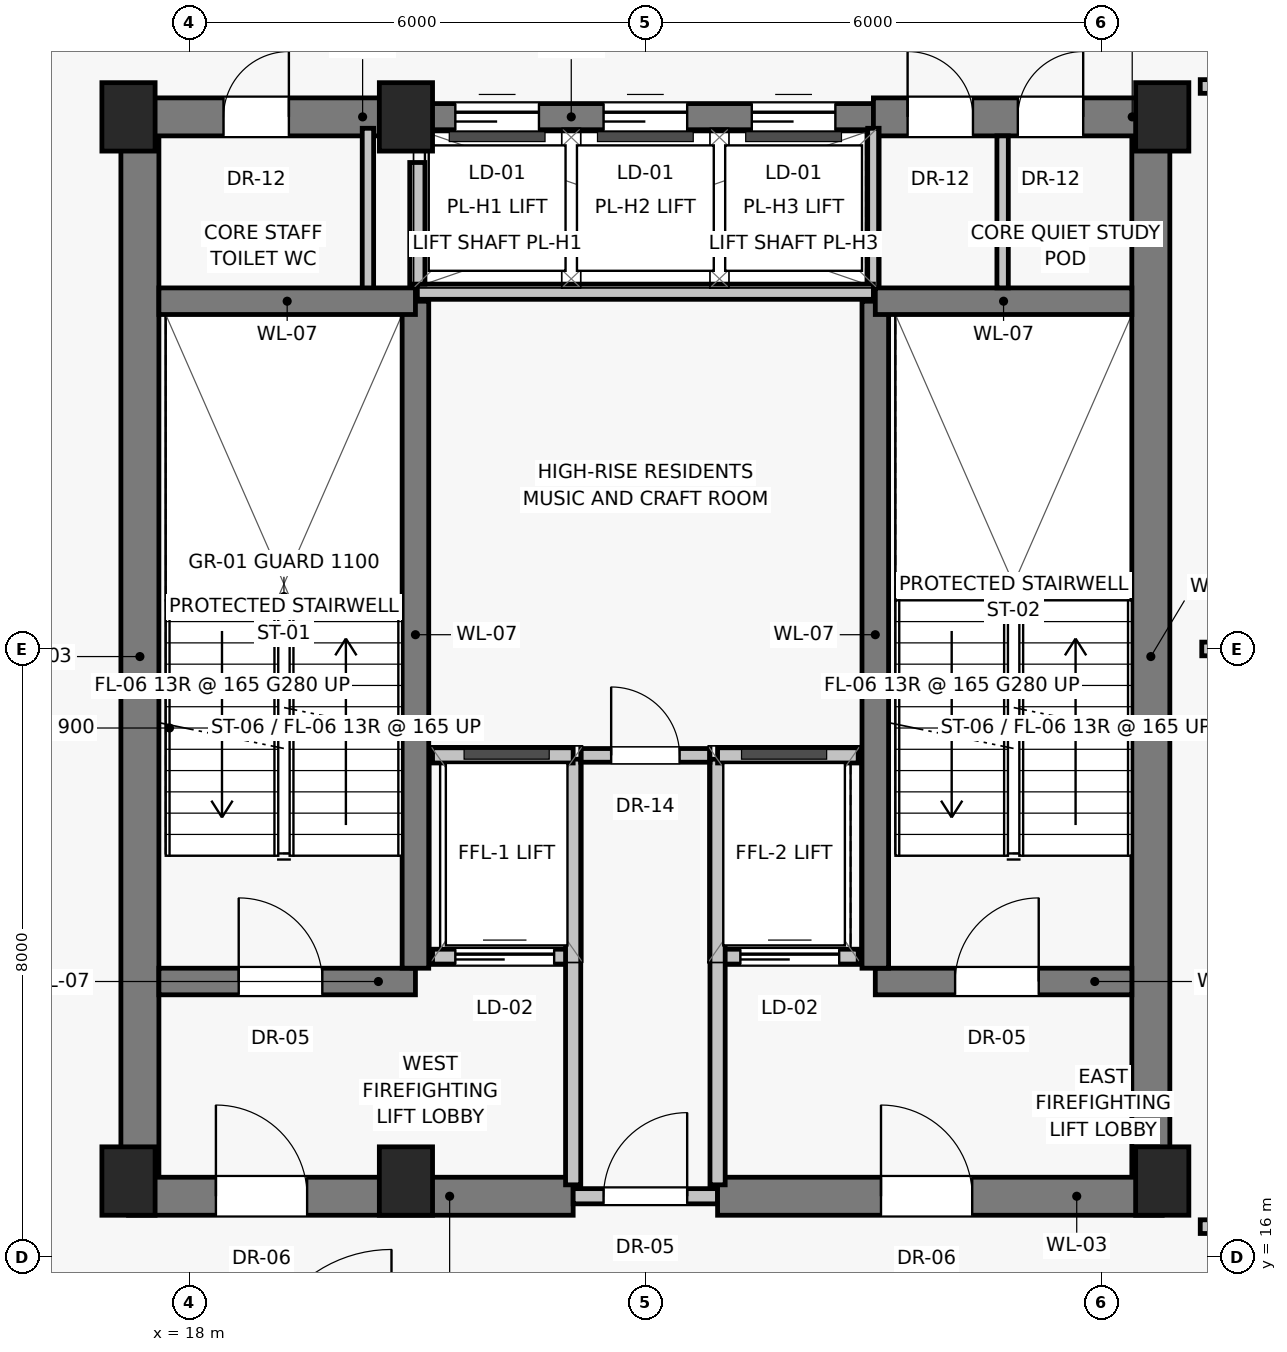
"""IFC4 building model, lengths in metres.
Left out: names, types, materials, properties, quantities, classifications, styles, units other than length and angle.
Written with IfcOpenShell. Run it as: python <this file> out.ifc"""

import sys

from ifc_helpers import new_model, si_unit, direction, frame, frame_2d, origin, origin_2d, place, context, subcontext, project, spatial, rectangle, extrude, source, transform, mapped, element, fill, save


model = new_model("IFC4")
c1 = context("Model", 3, precision=1e-05, world=origin(), true_north=direction((0.0, 1.0)))
c2 = subcontext(c1, "Body", "Model", "MODEL_VIEW")
j1 = project(units=[si_unit("LENGTHUNIT", "METRE"), si_unit("PLANEANGLEUNIT", "RADIAN")], contexts=[c1])
p1 = place(None, origin())
s1 = spatial("IfcSite", under=j1, at=p1, CompositionType="ELEMENT")
p2 = place(p1, origin())
s2 = spatial("IfcBuilding", under=s1, at=p2, CompositionType="ELEMENT")
p3 = place(p2, frame((0.0, 0.0, 211.35)))
s3 = spatial("IfcBuildingStorey", under=s2, at=p3, CompositionType="ELEMENT", Elevation=211.35)
for number, where, z_axis, x_axis in (
    (1, (17.2, 17.0, 0.0), (0.0, 0.0, 1.0), (1.0, 0.0, 0.0)),
    (2, (20.85, 17.0, 0.0), (0.0, 0.0, 1.0), (1.0, 0.0, 0.0)),
    (3, (30.8, 17.0, 0.0), (0.0, 0.0, 1.0), (1.0, 0.0, 0.0)),
    (4, (17.2, 31.0, 0.0), (0.0, 0.0, 1.0), (1.0, 0.0, 0.0)),
    (5, (20.85, 31.0, 0.0), (0.0, 0.0, 1.0), (1.0, 0.0, 0.0)),
    (6, (30.8, 31.0, 0.0), (0.0, 0.0, 1.0), (1.0, 0.0, 0.0)),
):
    element("IfcColumn", number, at=place(p3, frame(where, z_axis=z_axis, x_axis=x_axis)), inside=s3, PredefinedType="PILASTER", context=c2, shape_type="SweptSolid", body=[
        extrude(rectangle(XDim=0.7, YDim=0.9, at=origin_2d()), origin(), (0.0, 0.0, 1.0), 4.3),
    ])
for number, where, z_axis, x_axis in (
    (7, (17.35, 16.8, 0.0), (0.0, 0.0, 1.0), (0.0, 1.0, 0.0)),
    (8, (30.65, 16.8, 0.0), (0.0, 0.0, 1.0), (0.0, 1.0, 0.0)),
):
    element("IfcWall", number, at=place(p3, frame(where, z_axis=z_axis, x_axis=x_axis)), inside=s3, PredefinedType="SHEAR", context=c2, shape_type="SweptSolid", body=[
        extrude(rectangle(XDim=14.2, YDim=0.5, at=frame_2d((7.1, 0.0))), origin(), (0.0, 0.0, 1.0), 4.065),
    ])
p4 = place(p3, frame((17.2, 16.8, 0.0), z_axis=(0.0, 0.0, 1.0), x_axis=(1.0, 0.0, 0.0)))
e9 = element("IfcWall", 9, at=p4, inside=s3, PredefinedType="SHEAR", context=c2, shape_type="SweptSolid", body=[
    extrude(rectangle(XDim=5.85, YDim=0.5, at=frame_2d((2.925, 0.0))), origin(), (0.0, 0.0, 1.0), 4.065),
])
p5 = place(p4, frame((1.15, 0.0, 0.0)))
e10 = element("IfcOpeningElement", 10, at=p5, cuts=e9, PredefinedType="OPENING", context=c2, shape_type="SweptSolid", body=[
    extrude(rectangle(XDim=1.2, YDim=2.03, at=frame_2d((0.6, 1.015))), frame((0.0, 0.26, 0.0), z_axis=(0.0, -1.0, 0.0), x_axis=(1.0, 0.0, 0.0)), (0.0, 0.0, 1.0), 0.52),
])
p6 = place(p3, frame((23.05, 16.8, 0.0), z_axis=(0.0, 0.0, 1.0), x_axis=(1.0, 0.0, 0.0)))
e11 = element("IfcWall", 11, at=p6, inside=s3, PredefinedType="SOLIDWALL", context=c2, shape_type="SweptSolid", body=[
    extrude(rectangle(XDim=1.9, YDim=0.2, at=frame_2d((0.95, 0.0))), origin(), (0.0, 0.0, 1.0), 3.215),
])
p7 = place(p6, frame((0.4, 0.0, 0.0)))
e12 = element("IfcOpeningElement", 12, at=p7, cuts=e11, PredefinedType="OPENING", context=c2, shape_type="SweptSolid", body=[
    extrude(rectangle(XDim=1.1, YDim=2.03, at=frame_2d((0.55, 1.015))), frame((0.0, 0.11, 0.0), z_axis=(0.0, -1.0, 0.0), x_axis=(1.0, 0.0, 0.0)), (0.0, 0.0, 1.0), 0.22),
])
p8 = place(p3, frame((24.95, 16.8, 0.0), z_axis=(0.0, 0.0, 1.0), x_axis=(1.0, 0.0, 0.0)))
e13 = element("IfcWall", 13, at=p8, inside=s3, PredefinedType="SHEAR", context=c2, shape_type="SweptSolid", body=[
    extrude(rectangle(XDim=5.85, YDim=0.5, at=frame_2d((2.925, 0.0))), origin(), (0.0, 0.0, 1.0), 4.065),
])
p9 = place(p8, frame((2.15, 0.0, 0.0)))
e14 = element("IfcOpeningElement", 14, at=p9, cuts=e13, PredefinedType="OPENING", context=c2, shape_type="SweptSolid", body=[
    extrude(rectangle(XDim=1.2, YDim=2.03, at=frame_2d((0.6, 1.015))), frame((0.0, 0.26, 0.0), z_axis=(0.0, -1.0, 0.0), x_axis=(1.0, 0.0, 0.0)), (0.0, 0.0, 1.0), 0.52),
])
p10 = place(p3, frame((17.2, 31.0, 0.0), z_axis=(0.0, 0.0, 1.0), x_axis=(1.0, 0.0, 0.0)))
e15 = element("IfcWall", 15, at=p10, inside=s3, PredefinedType="SHEAR", context=c2, shape_type="SweptSolid", body=[
    extrude(rectangle(XDim=3.8, YDim=0.5, at=frame_2d((1.9, 0.0))), origin(), (0.0, 0.0, 1.0), 4.065),
])
p11 = place(p10, frame((1.25, 0.0, 0.0)))
e16 = element("IfcOpeningElement", 16, at=p11, cuts=e15, PredefinedType="OPENING", context=c2, shape_type="SweptSolid", body=[
    extrude(rectangle(XDim=0.86, YDim=2.01, at=frame_2d((0.43, 1.005))), frame((0.0, 0.26, 0.0), z_axis=(0.0, -1.0, 0.0), x_axis=(1.0, 0.0, 0.0)), (0.0, 0.0, 1.0), 0.52),
])
p12 = place(p3, frame((21.0, 31.0, 0.0), z_axis=(0.0, 0.0, 1.0), x_axis=(1.0, 0.0, 0.0)))
e17 = element("IfcWall", 17, at=p12, inside=s3, PredefinedType="SHEAR", context=c2, shape_type="SweptSolid", body=[
    extrude(rectangle(XDim=6.0, YDim=0.35, at=frame_2d((3.0, 0.0))), origin(), (0.0, 0.0, 1.0), 4.065),
])
p13 = place(p12, frame((0.5, 0.0, 0.0)))
e18 = element("IfcOpeningElement", 18, at=p13, cuts=e17, PredefinedType="OPENING", context=c2, shape_type="SweptSolid", body=[
    extrude(rectangle(XDim=1.1, YDim=2.08, at=frame_2d((0.55, 1.04))), frame((0.0, 0.185, 0.0), z_axis=(0.0, -1.0, 0.0), x_axis=(1.0, 0.0, 0.0)), (0.0, 0.0, 1.0), 0.37),
])
p14 = place(p12, frame((2.45, 0.0, 0.0)))
e19 = element("IfcOpeningElement", 19, at=p14, cuts=e17, PredefinedType="OPENING", context=c2, shape_type="SweptSolid", body=[
    extrude(rectangle(XDim=1.1, YDim=2.08, at=frame_2d((0.55, 1.04))), frame((0.0, 0.185, 0.0), z_axis=(0.0, -1.0, 0.0), x_axis=(1.0, 0.0, 0.0)), (0.0, 0.0, 1.0), 0.37),
])
p15 = place(p12, frame((4.4, 0.0, 0.0)))
e20 = element("IfcOpeningElement", 20, at=p15, cuts=e17, PredefinedType="OPENING", context=c2, shape_type="SweptSolid", body=[
    extrude(rectangle(XDim=1.1, YDim=2.08, at=frame_2d((0.55, 1.04))), frame((0.0, 0.185, 0.0), z_axis=(0.0, -1.0, 0.0), x_axis=(1.0, 0.0, 0.0)), (0.0, 0.0, 1.0), 0.37),
])
p16 = place(p3, frame((27.0, 31.0, 0.0), z_axis=(0.0, 0.0, 1.0), x_axis=(1.0, 0.0, 0.0)))
e21 = element("IfcWall", 21, at=p16, inside=s3, PredefinedType="SHEAR", context=c2, shape_type="SweptSolid", body=[
    extrude(rectangle(XDim=3.8, YDim=0.5, at=frame_2d((1.9, 0.0))), origin(), (0.0, 0.0, 1.0), 4.065),
])
p17 = place(p16, frame((0.45, 0.0, 0.0)))
e22 = element("IfcOpeningElement", 22, at=p17, cuts=e21, PredefinedType="OPENING", context=c2, shape_type="SweptSolid", body=[
    extrude(rectangle(XDim=0.86, YDim=2.01, at=frame_2d((0.43, 1.005))), frame((0.0, 0.26, 0.0), z_axis=(0.0, -1.0, 0.0), x_axis=(1.0, 0.0, 0.0)), (0.0, 0.0, 1.0), 0.52),
])
p18 = place(p16, frame((1.9, 0.0, 0.0)))
e23 = element("IfcOpeningElement", 23, at=p18, cuts=e21, PredefinedType="OPENING", context=c2, shape_type="SweptSolid", body=[
    extrude(rectangle(XDim=0.86, YDim=2.01, at=frame_2d((0.43, 1.005))), frame((0.0, 0.26, 0.0), z_axis=(0.0, -1.0, 0.0), x_axis=(1.0, 0.0, 0.0)), (0.0, 0.0, 1.0), 0.52),
])
for number, where, z_axis, x_axis in (
    (24, (20.35, 28.65, 0.0), (0.0, 0.0, 1.0), (0.0, 1.0, 0.0)),
    (25, (27.0, 28.65, 0.0), (0.0, 0.0, 1.0), (0.0, 1.0, 0.0)),
):
    element("IfcWall", number, at=place(p3, frame(where, z_axis=z_axis, x_axis=x_axis)), inside=s3, PredefinedType="PARTITIONING", context=c2, shape_type="SweptSolid", body=[
        extrude(rectangle(XDim=2.2, YDim=0.15, at=frame_2d((1.1, 0.0))), origin(), (0.0, 0.0, 1.0), 4.065),
    ])
p19 = place(p3, frame((17.6, 19.625, 0.0), z_axis=(0.0, 0.0, 1.0), x_axis=(1.0, 0.0, 0.0)))
e26 = element("IfcWall", 26, at=p19, inside=s3, PredefinedType="SHEAR", context=c2, shape_type="SweptSolid", body=[
    extrude(rectangle(XDim=3.375, YDim=0.35, at=frame_2d((1.688, 0.0))), origin(), (0.0, 0.0, 1.0), 4.065),
])
p20 = place(p19, frame((1.05, 0.0, 0.0)))
e27 = element("IfcOpeningElement", 27, at=p20, cuts=e26, PredefinedType="OPENING", context=c2, shape_type="SweptSolid", body=[
    extrude(rectangle(XDim=1.1, YDim=2.03, at=frame_2d((0.55, 1.015))), frame((0.0, 0.185, 0.0), z_axis=(0.0, -1.0, 0.0), x_axis=(1.0, 0.0, 0.0)), (0.0, 0.0, 1.0), 0.37),
])
p21 = place(p3, frame((21.2, 19.95, 0.0), z_axis=(0.0, 0.0, 1.0), x_axis=(1.0, 0.0, 0.0)))
e28 = element("IfcWall", 28, at=p21, inside=s3, PredefinedType="SOLIDWALL", context=c2, shape_type="SweptSolid", body=[
    extrude(rectangle(XDim=1.85, YDim=0.2, at=frame_2d((0.925, 0.0))), origin(), (0.0, 0.0, 1.0), 4.065),
])
p22 = place(p21, frame((0.3, 0.0, 0.0)))
e29 = element("IfcOpeningElement", 29, at=p22, cuts=e28, PredefinedType="OPENING", context=c2, shape_type="SweptSolid", body=[
    extrude(rectangle(XDim=1.3, YDim=2.25, at=frame_2d((0.65, 1.125))), frame((0.0, 0.11, 0.0), z_axis=(0.0, -1.0, 0.0), x_axis=(1.0, 0.0, 0.0)), (0.0, 0.0, 1.0), 0.22),
])
p23 = place(p3, frame((24.95, 19.95, 0.0), z_axis=(0.0, 0.0, 1.0), x_axis=(1.0, 0.0, 0.0)))
e30 = element("IfcWall", 30, at=p23, inside=s3, PredefinedType="SOLIDWALL", context=c2, shape_type="SweptSolid", body=[
    extrude(rectangle(XDim=1.85, YDim=0.2, at=frame_2d((0.925, 0.0))), origin(), (0.0, 0.0, 1.0), 4.065),
])
p24 = place(p23, frame((0.3, 0.0, 0.0)))
e31 = element("IfcOpeningElement", 31, at=p24, cuts=e30, PredefinedType="OPENING", context=c2, shape_type="SweptSolid", body=[
    extrude(rectangle(XDim=1.3, YDim=2.25, at=frame_2d((0.65, 1.125))), frame((0.0, 0.11, 0.0), z_axis=(0.0, -1.0, 0.0), x_axis=(1.0, 0.0, 0.0)), (0.0, 0.0, 1.0), 0.22),
])
p25 = place(p3, frame((27.025, 19.625, 0.0), z_axis=(0.0, 0.0, 1.0), x_axis=(1.0, 0.0, 0.0)))
e32 = element("IfcWall", 32, at=p25, inside=s3, PredefinedType="SHEAR", context=c2, shape_type="SweptSolid", body=[
    extrude(rectangle(XDim=3.375, YDim=0.35, at=frame_2d((1.688, 0.0))), origin(), (0.0, 0.0, 1.0), 4.065),
])
p26 = place(p25, frame((1.05, 0.0, 0.0)))
e33 = element("IfcOpeningElement", 33, at=p26, cuts=e32, PredefinedType="OPENING", context=c2, shape_type="SweptSolid", body=[
    extrude(rectangle(XDim=1.1, YDim=2.03, at=frame_2d((0.55, 1.015))), frame((0.0, 0.185, 0.0), z_axis=(0.0, -1.0, 0.0), x_axis=(1.0, 0.0, 0.0)), (0.0, 0.0, 1.0), 0.37),
])
for number, where, z_axis, x_axis in (
    (34, (20.975, 19.8, 0.0), (0.0, 0.0, 1.0), (0.0, 1.0, 0.0)),
    (35, (27.025, 19.8, 0.0), (0.0, 0.0, 1.0), (0.0, 1.0, 0.0)),
):
    element("IfcWall", number, at=place(p3, frame(where, z_axis=z_axis, x_axis=x_axis)), inside=s3, PredefinedType="SHEAR", context=c2, shape_type="SweptSolid", body=[
        extrude(rectangle(XDim=8.775, YDim=0.35, at=frame_2d((4.387, 0.0))), origin(), (0.0, 0.0, 1.0), 4.065),
    ])
for number, where, z_axis, x_axis in (
    (36, (17.6, 28.575, 0.0), (0.0, 0.0, 1.0), (1.0, 0.0, 0.0)),
    (37, (27.025, 28.575, 0.0), (0.0, 0.0, 1.0), (1.0, 0.0, 0.0)),
):
    element("IfcWall", number, at=place(p3, frame(where, z_axis=z_axis, x_axis=x_axis)), inside=s3, PredefinedType="SHEAR", context=c2, shape_type="SweptSolid", body=[
        extrude(rectangle(XDim=3.375, YDim=0.35, at=frame_2d((1.688, 0.0))), origin(), (0.0, 0.0, 1.0), 4.065),
    ])
for number, where, z_axis, x_axis in (
    (38, (23.05, 16.95, 0.0), (0.0, 0.0, 1.0), (0.0, 1.0, 0.0)),
    (39, (24.95, 16.95, 0.0), (0.0, 0.0, 1.0), (0.0, 1.0, 0.0)),
):
    element("IfcWall", number, at=place(p3, frame(where, z_axis=z_axis, x_axis=x_axis)), inside=s3, PredefinedType="SOLIDWALL", context=c2, shape_type="SweptSolid", body=[
        extrude(rectangle(XDim=5.6, YDim=0.2, at=frame_2d((2.8, 0.0))), origin(), (0.0, 0.0, 1.0), 4.065),
    ])
for number, where, z_axis, x_axis in (
    (40, (21.2, 22.6, 0.0), (0.0, 0.0, 1.0), (1.0, 0.0, 0.0)),
    (41, (24.95, 22.6, 0.0), (0.0, 0.0, 1.0), (1.0, 0.0, 0.0)),
):
    element("IfcWall", number, at=place(p3, frame(where, z_axis=z_axis, x_axis=x_axis)), inside=s3, PredefinedType="SOLIDWALL", context=c2, shape_type="SweptSolid", body=[
        extrude(rectangle(XDim=1.85, YDim=0.2, at=frame_2d((0.925, 0.0))), origin(), (0.0, 0.0, 1.0), 4.065),
    ])
p27 = place(p3, frame((21.0, 28.7, 0.0), z_axis=(0.0, 0.0, 1.0), x_axis=(1.0, 0.0, 0.0)))
e42 = element("IfcWall", 42, at=p27, inside=s3, PredefinedType="SOLIDWALL", context=c2, shape_type="SweptSolid", body=[
    extrude(rectangle(XDim=6.0, YDim=0.2, at=frame_2d((3.0, 0.0))), origin(), (0.0, 0.0, 1.0), 4.065),
])
p28 = place(p3, frame((21.0, 28.8, 0.0), z_axis=(0.0, 0.0, 1.0), x_axis=(0.0, 1.0, 0.0)))
e43 = element("IfcWall", 43, at=p28, inside=s3, PredefinedType="SOLIDWALL", context=c2, shape_type="SweptSolid", body=[
    extrude(rectangle(XDim=1.6, YDim=0.2, at=frame_2d((0.8, 0.0))), origin(), (0.0, 0.0, 1.0), 4.065),
])
p29 = place(p3, frame((23.15, 22.6, 0.0), z_axis=(0.0, 0.0, 1.0), x_axis=(1.0, 0.0, 0.0)))
e44 = element("IfcWall", 44, at=p29, inside=s3, PredefinedType="PARTITIONING", context=c2, shape_type="SweptSolid", body=[
    extrude(rectangle(XDim=1.7, YDim=0.18, at=frame_2d((0.85, 0.0))), origin(), (0.0, 0.0, 1.0), 4.065),
])
p30 = place(p29, frame((0.4, 0.0, 0.0)))
e45 = element("IfcOpeningElement", 45, at=p30, cuts=e44, PredefinedType="OPENING", context=c2, shape_type="SweptSolid", body=[
    extrude(rectangle(XDim=0.9, YDim=2.01, at=frame_2d((0.45, 1.005))), frame((0.0, 0.1, 0.0), z_axis=(0.0, -1.0, 0.0), x_axis=(1.0, 0.0, 0.0)), (0.0, 0.0, 1.0), 0.2),
])
p31 = place(p3, frame((28.7, 28.75, 0.0), z_axis=(0.0, 0.0, 1.0), x_axis=(0.0, 1.0, 0.0)))
e46 = element("IfcWall", 46, at=p31, inside=s3, PredefinedType="PARTITIONING", context=c2, shape_type="SweptSolid", body=[
    extrude(rectangle(XDim=2.0, YDim=0.15, at=frame_2d((1.0, 0.0))), origin(), (0.0, 0.0, 1.0), 4.065),
])
p32 = place(p3, frame((31.32, 24.0, 0.0), z_axis=(0.0, 0.0, 1.0), x_axis=(1.0, 0.0, 0.0)))
e47 = element("IfcWall", 47, at=p32, inside=s3, PredefinedType="PARTITIONING", context=c2, shape_type="SweptSolid", body=[
    extrude(rectangle(XDim=10.427, YDim=0.18, at=frame_2d((5.213, 0.0))), origin(), (0.0, 0.0, 1.0), 4.065),
])
p33 = place(p3, frame((31.3, 16.4, 0.0), z_axis=(0.0, 0.0, 1.0), x_axis=(1.0, 0.0, 0.0)))
e48 = element("IfcWall", 48, at=p33, inside=s3, PredefinedType="PARTITIONING", context=c2, shape_type="SweptSolid", body=[
    extrude(rectangle(XDim=1.92, YDim=0.18, at=frame_2d((0.96, 0.0))), origin(), (0.0, 0.0, 1.0), 4.065),
])
p34 = place(p33, frame((0.72, 0.0, 0.0)))
e49 = element("IfcOpeningElement", 49, at=p34, cuts=e48, PredefinedType="OPENING", context=c2, shape_type="SweptSolid", body=[
    extrude(rectangle(XDim=1.0, YDim=2.01, at=frame_2d((0.5, 1.005))), frame((0.0, 0.1, 0.0), z_axis=(0.0, -1.0, 0.0), x_axis=(1.0, 0.0, 0.0)), (0.0, 0.0, 1.0), 0.2),
])
p35 = place(p3, frame((31.3, 31.4, 0.0), z_axis=(0.0, 0.0, 1.0), x_axis=(1.0, 0.0, 0.0)))
e50 = element("IfcWall", 50, at=p35, inside=s3, PredefinedType="PARTITIONING", context=c2, shape_type="SweptSolid", body=[
    extrude(rectangle(XDim=1.92, YDim=0.18, at=frame_2d((0.96, 0.0))), origin(), (0.0, 0.0, 1.0), 3.286),
])
p36 = place(p35, frame((0.72, 0.0, 0.0)))
e51 = element("IfcOpeningElement", 51, at=p36, cuts=e50, PredefinedType="OPENING", context=c2, shape_type="SweptSolid", body=[
    extrude(rectangle(XDim=1.0, YDim=2.01, at=frame_2d((0.5, 1.005))), frame((0.0, 0.1, 0.0), z_axis=(0.0, -1.0, 0.0), x_axis=(1.0, 0.0, 0.0)), (0.0, 0.0, 1.0), 0.2),
])
m1 = source(origin(), c2, "Body", "SweptSolid", [
    extrude(rectangle(XDim=1.2, YDim=2.03, at=frame_2d((0.6, 1.015))), frame((0.0, 0.025, 0.0), z_axis=(0.0, -1.0, 0.0), x_axis=(1.0, 0.0, 0.0)), (0.0, 0.0, 1.0), 0.05),
])
p37 = place(p5, origin())
e52 = element("IfcDoor", 52, at=p37, inside=s3, OperationType="SINGLE_SWING_LEFT", PredefinedType="DOOR", context=c2, shape_type="MappedRepresentation", body=[
    mapped(m1, transform((0.0, 0.0, 0.0), scale=1.0)),
])
fill(e10, e52)
m2 = source(origin(), c2, "Body", "SweptSolid", [
    extrude(rectangle(XDim=1.1, YDim=2.03, at=frame_2d((0.55, 1.015))), frame((0.0, 0.025, 0.0), z_axis=(0.0, -1.0, 0.0), x_axis=(1.0, 0.0, 0.0)), (0.0, 0.0, 1.0), 0.05),
])
p38 = place(p7, origin())
e53 = element("IfcDoor", 53, at=p38, inside=s3, OperationType="SINGLE_SWING_RIGHT", PredefinedType="DOOR", context=c2, shape_type="MappedRepresentation", body=[
    mapped(m2, transform((0.0, 0.0, 0.0), scale=1.0)),
])
fill(e12, e53)
p39 = place(p9, origin())
e54 = element("IfcDoor", 54, at=p39, inside=s3, OperationType="SINGLE_SWING_LEFT", PredefinedType="DOOR", context=c2, shape_type="MappedRepresentation", body=[
    mapped(m1, transform((0.0, 0.0, 0.0), scale=1.0)),
])
fill(e14, e54)
m3 = source(origin(), c2, "Body", "SweptSolid", [
    extrude(rectangle(XDim=0.86, YDim=2.01, at=frame_2d((0.43, 1.005))), frame((0.0, 0.025, 0.0), z_axis=(0.0, -1.0, 0.0), x_axis=(1.0, 0.0, 0.0)), (0.0, 0.0, 1.0), 0.05),
])
p40 = place(p11, origin())
e55 = element("IfcDoor", 55, at=p40, inside=s3, OperationType="SINGLE_SWING_RIGHT", PredefinedType="DOOR", context=c2, shape_type="MappedRepresentation", body=[
    mapped(m3, transform((0.0, 0.0, 0.0), scale=1.0)),
])
fill(e16, e55)
m4 = source(origin(), c2, "Body", "SweptSolid", [
    extrude(rectangle(XDim=1.1, YDim=2.08, at=frame_2d((0.55, 1.04))), frame((0.0, 0.025, 0.0), z_axis=(0.0, -1.0, 0.0), x_axis=(1.0, 0.0, 0.0)), (0.0, 0.0, 1.0), 0.05),
])
p41 = place(p13, origin())
e56 = element("IfcDoor", 56, at=p41, inside=s3, OperationType="SLIDING_TO_LEFT", PredefinedType="DOOR", context=c2, shape_type="MappedRepresentation", body=[
    mapped(m4, transform((0.0, 0.0, 0.0), scale=1.0)),
])
fill(e18, e56)
p42 = place(p14, origin())
e57 = element("IfcDoor", 57, at=p42, inside=s3, OperationType="SLIDING_TO_LEFT", PredefinedType="DOOR", context=c2, shape_type="MappedRepresentation", body=[
    mapped(m4, transform((0.0, 0.0, 0.0), scale=1.0)),
])
fill(e19, e57)
p43 = place(p15, origin())
e58 = element("IfcDoor", 58, at=p43, inside=s3, OperationType="SLIDING_TO_LEFT", PredefinedType="DOOR", context=c2, shape_type="MappedRepresentation", body=[
    mapped(m4, transform((0.0, 0.0, 0.0), scale=1.0)),
])
fill(e20, e58)
p44 = place(p17, origin())
e59 = element("IfcDoor", 59, at=p44, inside=s3, OperationType="SINGLE_SWING_LEFT", PredefinedType="DOOR", context=c2, shape_type="MappedRepresentation", body=[
    mapped(m3, transform((0.0, 0.0, 0.0), scale=1.0)),
])
fill(e22, e59)
p45 = place(p18, origin())
e60 = element("IfcDoor", 60, at=p45, inside=s3, OperationType="SINGLE_SWING_RIGHT", PredefinedType="DOOR", context=c2, shape_type="MappedRepresentation", body=[
    mapped(m3, transform((0.0, 0.0, 0.0), scale=1.0)),
])
fill(e23, e60)
p46 = place(p20, origin())
e61 = element("IfcDoor", 61, at=p46, inside=s3, OperationType="SINGLE_SWING_LEFT", PredefinedType="DOOR", context=c2, shape_type="MappedRepresentation", body=[
    mapped(m2, transform((0.0, 0.0, 0.0), scale=1.0)),
])
fill(e27, e61)
m5 = source(origin(), c2, "Body", "SweptSolid", [
    extrude(rectangle(XDim=1.3, YDim=2.25, at=frame_2d((0.65, 1.125))), frame((0.0, 0.025, 0.0), z_axis=(0.0, -1.0, 0.0), x_axis=(1.0, 0.0, 0.0)), (0.0, 0.0, 1.0), 0.05),
])
p47 = place(p22, origin())
e62 = element("IfcDoor", 62, at=p47, inside=s3, OperationType="SLIDING_TO_LEFT", PredefinedType="DOOR", context=c2, shape_type="MappedRepresentation", body=[
    mapped(m5, transform((0.0, 0.0, 0.0), scale=1.0)),
])
fill(e29, e62)
p48 = place(p24, origin())
e63 = element("IfcDoor", 63, at=p48, inside=s3, OperationType="SLIDING_TO_LEFT", PredefinedType="DOOR", context=c2, shape_type="MappedRepresentation", body=[
    mapped(m5, transform((0.0, 0.0, 0.0), scale=1.0)),
])
fill(e31, e63)
p49 = place(p26, origin())
e64 = element("IfcDoor", 64, at=p49, inside=s3, OperationType="SINGLE_SWING_RIGHT", PredefinedType="DOOR", context=c2, shape_type="MappedRepresentation", body=[
    mapped(m2, transform((0.0, 0.0, 0.0), scale=1.0)),
])
fill(e33, e64)
m6 = source(origin(), c2, "Body", "SweptSolid", [
    extrude(rectangle(XDim=0.9, YDim=2.01, at=frame_2d((0.45, 1.005))), frame((0.0, 0.025, 0.0), z_axis=(0.0, -1.0, 0.0), x_axis=(1.0, 0.0, 0.0)), (0.0, 0.0, 1.0), 0.05),
])
p50 = place(p30, origin())
e65 = element("IfcDoor", 65, at=p50, inside=s3, OperationType="SINGLE_SWING_LEFT", PredefinedType="DOOR", context=c2, shape_type="MappedRepresentation", body=[
    mapped(m6, transform((0.0, 0.0, 0.0), scale=1.0)),
])
fill(e45, e65)
save(model, sys.argv[1])
